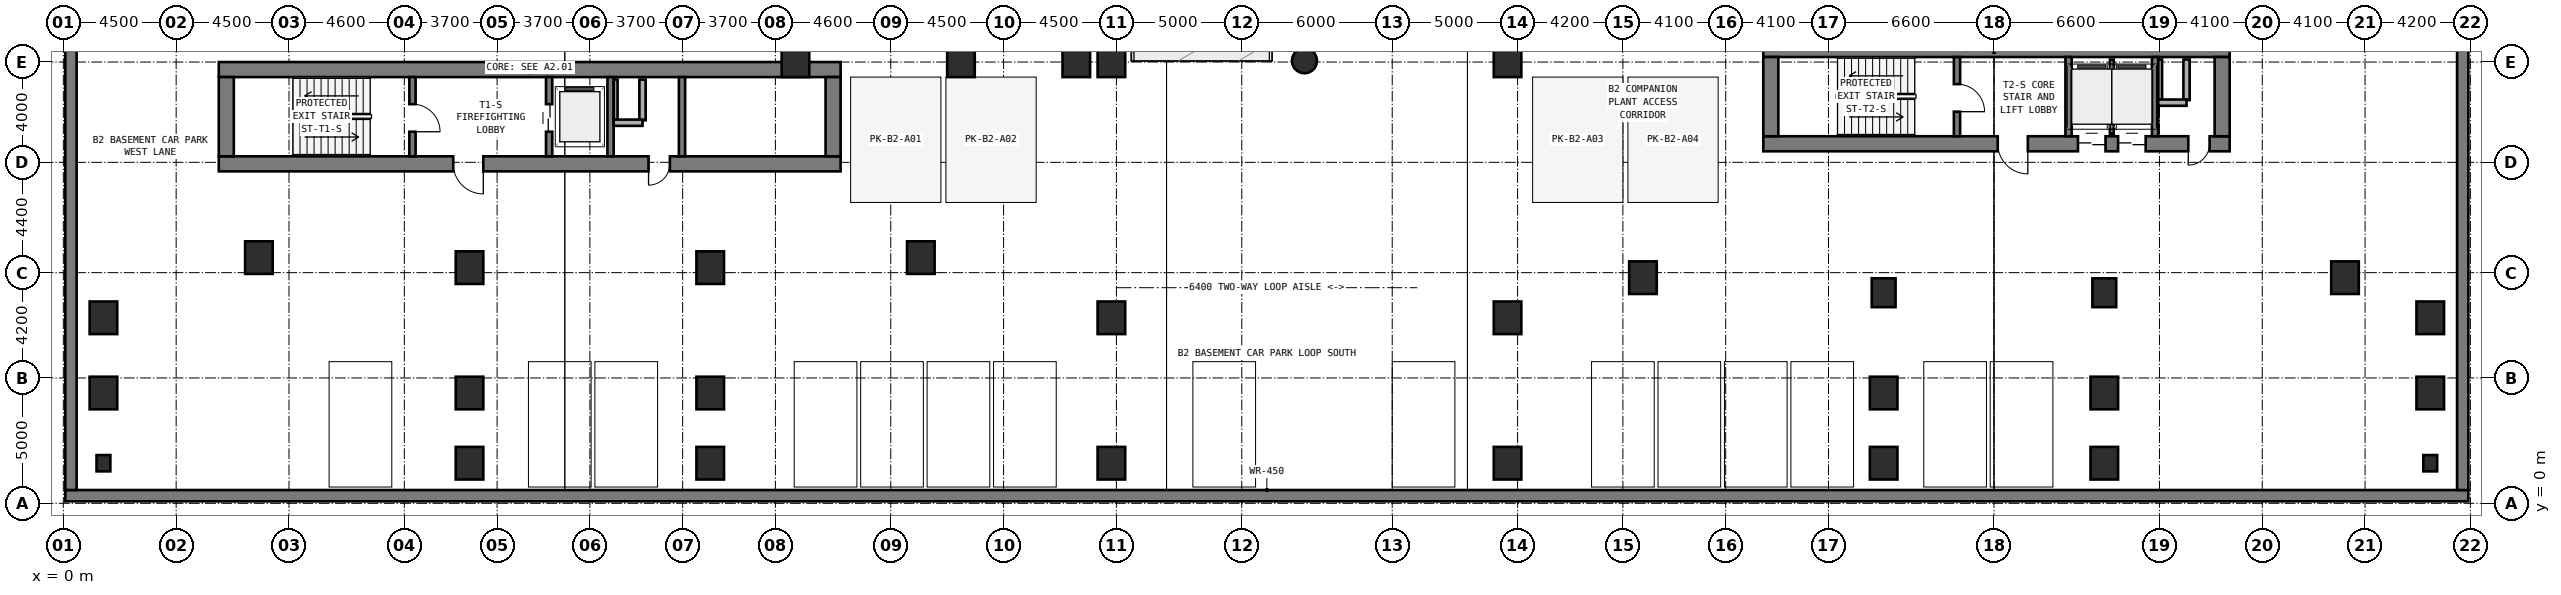
"""IFC4 building model, lengths in metres.
Left out: names, types, materials, properties, quantities, classifications, styles, units other than length and angle.
Written with IfcOpenShell. Run it as: python <this file> out.ifc"""

import sys

from ifc_helpers import new_model, si_unit, direction, frame, frame_2d, origin, origin_2d, place, context, subcontext, project, spatial, rectangle, circle, extrude, element, fill, save


model = new_model("IFC4")
c1 = context("Model", 3, precision=1e-05, world=origin(), true_north=direction((0.0, 1.0)))
c2 = subcontext(c1, "Body", "Model", "MODEL_VIEW")
j1 = project(units=[si_unit("LENGTHUNIT", "METRE"), si_unit("PLANEANGLEUNIT", "RADIAN")], contexts=[c1])
p1 = place(None, origin())
s1 = spatial("IfcSite", under=j1, at=p1, CompositionType="ELEMENT")
p2 = place(p1, origin())
s2 = spatial("IfcBuilding", under=s1, at=p2, CompositionType="ELEMENT")
p3 = place(p2, frame((0.0, 0.0, -8.4)))
s3 = spatial("IfcBuildingStorey", under=s2, at=p3, CompositionType="ELEMENT", Elevation=-8.4)
p4 = place(p3, frame((0.08, 0.305, 0.0), z_axis=(0.0, 0.0, 1.0), x_axis=(1.0, 0.0, 0.0)))
e1 = element("IfcWall", 1, at=p4, inside=s3, PredefinedType="USERDEFINED", context=c2, shape_type="SweptSolid", body=[
    extrude(rectangle(XDim=95.84, YDim=0.45, at=frame_2d((47.92, 0.0))), origin(), (0.0, 0.0, 1.0), 4.2),
])
for number, where, z_axis, x_axis in (
    (2, (0.305, 49.47, 0.0), (0.0, 0.0, 1.0), (0.0, -1.0, 0.0)),
    (3, (95.695, 0.53, 0.0), (0.0, 0.0, 1.0), (0.0, 1.0, 0.0)),
):
    element("IfcWall", number, at=place(p3, frame(where, z_axis=z_axis, x_axis=x_axis)), inside=s3, PredefinedType="USERDEFINED", context=c2, shape_type="SweptSolid", body=[
        extrude(rectangle(XDim=48.94, YDim=0.45, at=frame_2d((24.47, 0.0))), origin(), (0.0, 0.0, 1.0), 4.2),
    ])
p5 = place(p3, frame((6.2, 13.54, 0.0), z_axis=(0.0, 0.0, 1.0), x_axis=(1.0, 0.0, 0.0)))
e4 = element("IfcWall", 4, at=p5, inside=s3, PredefinedType="SHEAR", context=c2, shape_type="SweptSolid", body=[
    extrude(rectangle(XDim=24.8, YDim=0.6, at=frame_2d((12.4, 0.0))), origin(), (0.0, 0.0, 1.0), 4.2),
])
p6 = place(p5, frame((9.35, 0.0, 0.0)))
e5 = element("IfcOpeningElement", 5, at=p6, cuts=e4, PredefinedType="OPENING", context=c2, shape_type="SweptSolid", body=[
    extrude(rectangle(XDim=1.2, YDim=2.15, at=frame_2d((0.6, 1.075))), frame((0.0, 0.31, 0.0), z_axis=(0.0, -1.0, 0.0), x_axis=(1.0, 0.0, 0.0)), (0.0, 0.0, 1.0), 0.62),
])
p7 = place(p5, frame((17.14, 0.0, 0.0)))
e6 = element("IfcOpeningElement", 6, at=p7, cuts=e4, PredefinedType="OPENING", context=c2, shape_type="SweptSolid", body=[
    extrude(rectangle(XDim=0.85, YDim=2.1, at=frame_2d((0.425, 1.05))), frame((0.0, 0.31, 0.0), z_axis=(0.0, -1.0, 0.0), x_axis=(1.0, 0.0, 0.0)), (0.0, 0.0, 1.0), 0.62),
])
p8 = place(p3, frame((6.2, 17.3, 0.0), z_axis=(0.0, 0.0, 1.0), x_axis=(1.0, 0.0, 0.0)))
e7 = element("IfcWall", 7, at=p8, inside=s3, PredefinedType="SHEAR", context=c2, shape_type="SweptSolid", body=[
    extrude(rectangle(XDim=24.8, YDim=0.6, at=frame_2d((12.4, 0.0))), origin(), (0.0, 0.0, 1.0), 4.2),
])
for number, where, z_axis, x_axis in (
    (8, (6.5, 13.84, 0.0), (0.0, 0.0, 1.0), (0.0, 1.0, 0.0)),
    (9, (30.7, 13.84, 0.0), (0.0, 0.0, 1.0), (0.0, 1.0, 0.0)),
):
    element("IfcWall", number, at=place(p3, frame(where, z_axis=z_axis, x_axis=x_axis)), inside=s3, PredefinedType="SHEAR", context=c2, shape_type="SweptSolid", body=[
        extrude(rectangle(XDim=3.16, YDim=0.6, at=frame_2d((1.58, 0.0))), origin(), (0.0, 0.0, 1.0), 4.2),
    ])
p9 = place(p3, frame((13.925, 13.84, 0.0), z_axis=(0.0, 0.0, 1.0), x_axis=(0.0, 1.0, 0.0)))
e10 = element("IfcWall", 10, at=p9, inside=s3, PredefinedType="STANDARD", context=c2, shape_type="SweptSolid", body=[
    extrude(rectangle(XDim=3.16, YDim=0.25, at=frame_2d((1.58, 0.0))), origin(), (0.0, 0.0, 1.0), 3.88),
])
p10 = place(p9, frame((0.98, 0.0, 0.0)))
e11 = element("IfcOpeningElement", 11, at=p10, cuts=e10, PredefinedType="OPENING", context=c2, shape_type="SweptSolid", body=[
    extrude(rectangle(XDim=1.1, YDim=2.15, at=frame_2d((0.55, 1.075))), frame((0.0, 0.135, 0.0), z_axis=(0.0, -1.0, 0.0), x_axis=(1.0, 0.0, 0.0)), (0.0, 0.0, 1.0), 0.27),
])
p11 = place(p3, frame((19.375, 13.84, 0.0), z_axis=(0.0, 0.0, 1.0), x_axis=(0.0, 1.0, 0.0)))
e12 = element("IfcWall", 12, at=p11, inside=s3, PredefinedType="STANDARD", context=c2, shape_type="SweptSolid", body=[
    extrude(rectangle(XDim=3.16, YDim=0.25, at=frame_2d((1.58, 0.0))), origin(), (0.0, 0.0, 1.0), 3.88),
])
p12 = place(p11, frame((0.98, 0.0, 0.0)))
e13 = element("IfcOpeningElement", 13, at=p12, cuts=e12, PredefinedType="OPENING", context=c2, shape_type="SweptSolid", body=[
    extrude(rectangle(XDim=1.1, YDim=2.15, at=frame_2d((0.55, 1.075))), frame((0.0, 0.135, 0.0), z_axis=(0.0, -1.0, 0.0), x_axis=(1.0, 0.0, 0.0)), (0.0, 0.0, 1.0), 0.27),
])
for number, where, z_axis, x_axis in (
    (14, (21.825, 13.84, 0.0), (0.0, 0.0, 1.0), (0.0, 1.0, 0.0)),
    (15, (24.675, 13.84, 0.0), (0.0, 0.0, 1.0), (0.0, 1.0, 0.0)),
):
    element("IfcWall", number, at=place(p3, frame(where, z_axis=z_axis, x_axis=x_axis)), inside=s3, PredefinedType="STANDARD", context=c2, shape_type="SweptSolid", body=[
        extrude(rectangle(XDim=3.16, YDim=0.25, at=frame_2d((1.58, 0.0))), origin(), (0.0, 0.0, 1.0), 3.88),
    ])
p13 = place(p3, frame((67.8, 14.34, 0.0), z_axis=(0.0, 0.0, 1.0), x_axis=(1.0, 0.0, 0.0)))
e16 = element("IfcWall", 16, at=p13, inside=s3, PredefinedType="SHEAR", context=c2, shape_type="SweptSolid", body=[
    extrude(rectangle(XDim=18.6, YDim=0.6, at=frame_2d((9.3, 0.0))), origin(), (0.0, 0.0, 1.0), 4.2),
])
p14 = place(p13, frame((9.35, 0.0, 0.0)))
e17 = element("IfcOpeningElement", 17, at=p14, cuts=e16, PredefinedType="OPENING", context=c2, shape_type="SweptSolid", body=[
    extrude(rectangle(XDim=1.2, YDim=2.15, at=frame_2d((0.6, 1.075))), frame((0.0, 0.31, 0.0), z_axis=(0.0, -1.0, 0.0), x_axis=(1.0, 0.0, 0.0)), (0.0, 0.0, 1.0), 0.62),
])
p15 = place(p13, frame((16.95, 0.0, 0.0)))
e18 = element("IfcOpeningElement", 18, at=p15, cuts=e16, PredefinedType="OPENING", context=c2, shape_type="SweptSolid", body=[
    extrude(rectangle(XDim=0.85, YDim=2.1, at=frame_2d((0.425, 1.05))), frame((0.0, 0.31, 0.0), z_axis=(0.0, -1.0, 0.0), x_axis=(1.0, 0.0, 0.0)), (0.0, 0.0, 1.0), 0.62),
])
p16 = place(p13, frame((12.55, 0.0, 0.0)))
e19 = element("IfcOpeningElement", 19, at=p16, cuts=e16, PredefinedType="OPENING", context=c2, shape_type="SweptSolid", body=[
    extrude(rectangle(XDim=1.1, YDim=2.15, at=frame_2d((0.55, 1.075))), frame((0.0, 0.31, 0.0), z_axis=(0.0, -1.0, 0.0), x_axis=(1.0, 0.0, 0.0)), (0.0, 0.0, 1.0), 0.62),
])
p17 = place(p13, frame((14.15, 0.0, 0.0)))
e20 = element("IfcOpeningElement", 20, at=p17, cuts=e16, PredefinedType="OPENING", context=c2, shape_type="SweptSolid", body=[
    extrude(rectangle(XDim=1.1, YDim=2.15, at=frame_2d((0.55, 1.075))), frame((0.0, 0.31, 0.0), z_axis=(0.0, -1.0, 0.0), x_axis=(1.0, 0.0, 0.0)), (0.0, 0.0, 1.0), 0.62),
])
p18 = place(p3, frame((67.8, 18.1, 0.0), z_axis=(0.0, 0.0, 1.0), x_axis=(1.0, 0.0, 0.0)))
e21 = element("IfcWall", 21, at=p18, inside=s3, PredefinedType="SHEAR", context=c2, shape_type="SweptSolid", body=[
    extrude(rectangle(XDim=18.6, YDim=0.6, at=frame_2d((9.3, 0.0))), origin(), (0.0, 0.0, 1.0), 4.2),
])
for number, where, z_axis, x_axis in (
    (22, (68.1, 14.64, 0.0), (0.0, 0.0, 1.0), (0.0, 1.0, 0.0)),
    (23, (86.1, 14.64, 0.0), (0.0, 0.0, 1.0), (0.0, 1.0, 0.0)),
):
    element("IfcWall", number, at=place(p3, frame(where, z_axis=z_axis, x_axis=x_axis)), inside=s3, PredefinedType="SHEAR", context=c2, shape_type="SweptSolid", body=[
        extrude(rectangle(XDim=3.16, YDim=0.6, at=frame_2d((1.58, 0.0))), origin(), (0.0, 0.0, 1.0), 4.2),
    ])
p19 = place(p3, frame((75.525, 14.64, 0.0), z_axis=(0.0, 0.0, 1.0), x_axis=(0.0, 1.0, 0.0)))
e24 = element("IfcWall", 24, at=p19, inside=s3, PredefinedType="STANDARD", context=c2, shape_type="SweptSolid", body=[
    extrude(rectangle(XDim=3.16, YDim=0.25, at=frame_2d((1.58, 0.0))), origin(), (0.0, 0.0, 1.0), 3.88),
])
p20 = place(p19, frame((0.98, 0.0, 0.0)))
e25 = element("IfcOpeningElement", 25, at=p20, cuts=e24, PredefinedType="OPENING", context=c2, shape_type="SweptSolid", body=[
    extrude(rectangle(XDim=1.1, YDim=2.15, at=frame_2d((0.55, 1.075))), frame((0.0, 0.135, 0.0), z_axis=(0.0, -1.0, 0.0), x_axis=(1.0, 0.0, 0.0)), (0.0, 0.0, 1.0), 0.27),
])
for number, where, z_axis, x_axis in (
    (26, (79.975, 14.64, 0.0), (0.0, 0.0, 1.0), (0.0, 1.0, 0.0)),
    (27, (83.425, 14.64, 0.0), (0.0, 0.0, 1.0), (0.0, 1.0, 0.0)),
):
    element("IfcWall", number, at=place(p3, frame(where, z_axis=z_axis, x_axis=x_axis)), inside=s3, PredefinedType="STANDARD", context=c2, shape_type="SweptSolid", body=[
        extrude(rectangle(XDim=3.16, YDim=0.25, at=frame_2d((1.58, 0.0))), origin(), (0.0, 0.0, 1.0), 3.88),
    ])
for number, where, z_axis, x_axis in (
    (28, (16.2, 9.4, 0.0), (0.0, 0.0, 1.0), (1.0, 0.0, 0.0)),
    (29, (25.8, 9.4, 0.0), (0.0, 0.0, 1.0), (1.0, 0.0, 0.0)),
    (30, (7.8, 9.8, 0.0), (0.0, 0.0, 1.0), (1.0, 0.0, 0.0)),
    (31, (34.2, 9.8, 0.0), (0.0, 0.0, 1.0), (1.0, 0.0, 0.0)),
    (32, (35.8, 17.65, 0.0), (0.0, 0.0, 1.0), (1.0, 0.0, 0.0)),
    (33, (29.2, 17.65, 0.0), (0.0, 0.0, 1.0), (1.0, 0.0, 0.0)),
    (34, (40.4, 17.65, 0.0), (0.0, 0.0, 1.0), (1.0, 0.0, 0.0)),
):
    element("IfcColumn", number, at=place(p3, frame(where, z_axis=z_axis, x_axis=x_axis)), inside=s3, PredefinedType="COLUMN", context=c2, shape_type="SweptSolid", body=[
        extrude(rectangle(XDim=1.1, YDim=1.3, at=origin_2d()), origin(), (0.0, 0.0, 1.0), 4.2),
    ])
for number, where, z_axis, x_axis in (
    (35, (72.6, 8.4, 0.0), (0.0, 0.0, 1.0), (1.0, 0.0, 0.0)),
    (36, (81.4, 8.4, 0.0), (0.0, 0.0, 1.0), (1.0, 0.0, 0.0)),
):
    element("IfcColumn", number, at=place(p3, frame(where, z_axis=z_axis, x_axis=x_axis)), inside=s3, PredefinedType="COLUMN", context=c2, shape_type="SweptSolid", body=[
        extrude(rectangle(XDim=0.95, YDim=1.15, at=origin_2d()), origin(), (0.0, 0.0, 1.0), 4.2),
    ])
for number, where, z_axis, x_axis in (
    (37, (63.0, 9.0, 0.0), (0.0, 0.0, 1.0), (1.0, 0.0, 0.0)),
    (38, (91.0, 9.0, 0.0), (0.0, 0.0, 1.0), (1.0, 0.0, 0.0)),
    (39, (41.8, 17.65, 0.0), (0.0, 0.0, 1.0), (1.0, 0.0, 0.0)),
):
    element("IfcColumn", number, at=place(p3, frame(where, z_axis=z_axis, x_axis=x_axis)), inside=s3, PredefinedType="COLUMN", context=c2, shape_type="SweptSolid", body=[
        extrude(rectangle(XDim=1.1, YDim=1.3, at=origin_2d()), origin(), (0.0, 0.0, 1.0), 4.2),
    ])
p21 = place(p3, frame((49.5, 17.65, 0.0), z_axis=(0.0, 0.0, 1.0), x_axis=(1.0, 0.0, 0.0)))
e40 = element("IfcColumn", 40, at=p21, inside=s3, PredefinedType="COLUMN", context=c2, shape_type="SweptSolid", body=[
    extrude(circle(Radius=0.5, at=origin_2d()), origin(), (0.0, 0.0, 1.0), 4.2),
])
p22 = place(p3, frame((57.6, 17.65, 0.0), z_axis=(0.0, 0.0, 1.0), x_axis=(1.0, 0.0, 0.0)))
e41 = element("IfcColumn", 41, at=p22, inside=s3, PredefinedType="COLUMN", context=c2, shape_type="SweptSolid", body=[
    extrude(rectangle(XDim=1.1, YDim=1.3, at=origin_2d()), origin(), (0.0, 0.0, 1.0), 4.2),
])
p23 = place(p3, frame((1.6, 1.6, 0.0), z_axis=(0.0, 0.0, 1.0), x_axis=(1.0, 0.0, 0.0)))
e42 = element("IfcColumn", 42, at=p23, inside=s3, PredefinedType="PILASTER", context=c2, shape_type="SweptSolid", body=[
    extrude(rectangle(XDim=0.55, YDim=0.65, at=origin_2d()), origin(), (0.0, 0.0, 1.0), 4.2),
])
for number, where, z_axis, x_axis in (
    (43, (16.2, 1.6, 0.0), (0.0, 0.0, 1.0), (1.0, 0.0, 0.0)),
    (44, (25.8, 1.6, 0.0), (0.0, 0.0, 1.0), (1.0, 0.0, 0.0)),
    (45, (41.8, 1.6, 0.0), (0.0, 0.0, 1.0), (1.0, 0.0, 0.0)),
    (46, (57.6, 1.6, 0.0), (0.0, 0.0, 1.0), (1.0, 0.0, 0.0)),
    (47, (72.6, 1.6, 0.0), (0.0, 0.0, 1.0), (1.0, 0.0, 0.0)),
    (48, (81.4, 1.6, 0.0), (0.0, 0.0, 1.0), (1.0, 0.0, 0.0)),
):
    element("IfcColumn", number, at=place(p3, frame(where, z_axis=z_axis, x_axis=x_axis)), inside=s3, PredefinedType="COLUMN", context=c2, shape_type="SweptSolid", body=[
        extrude(rectangle(XDim=1.1, YDim=1.3, at=origin_2d()), origin(), (0.0, 0.0, 1.0), 4.2),
    ])
p24 = place(p3, frame((94.4, 1.6, 0.0), z_axis=(0.0, 0.0, 1.0), x_axis=(1.0, 0.0, 0.0)))
e49 = element("IfcColumn", 49, at=p24, inside=s3, PredefinedType="PILASTER", context=c2, shape_type="SweptSolid", body=[
    extrude(rectangle(XDim=0.55, YDim=0.65, at=origin_2d()), origin(), (0.0, 0.0, 1.0), 4.2),
])
for number, where, z_axis, x_axis in (
    (50, (1.6, 4.4, 0.0), (0.0, 0.0, 1.0), (1.0, 0.0, 0.0)),
    (51, (16.2, 4.4, 0.0), (0.0, 0.0, 1.0), (1.0, 0.0, 0.0)),
    (52, (25.8, 4.4, 0.0), (0.0, 0.0, 1.0), (1.0, 0.0, 0.0)),
    (53, (72.6, 4.4, 0.0), (0.0, 0.0, 1.0), (1.0, 0.0, 0.0)),
    (54, (81.4, 4.4, 0.0), (0.0, 0.0, 1.0), (1.0, 0.0, 0.0)),
    (55, (94.4, 4.4, 0.0), (0.0, 0.0, 1.0), (1.0, 0.0, 0.0)),
    (56, (1.6, 7.4, 0.0), (0.0, 0.0, 1.0), (1.0, 0.0, 0.0)),
    (57, (41.8, 7.4, 0.0), (0.0, 0.0, 1.0), (1.0, 0.0, 0.0)),
    (58, (57.6, 7.4, 0.0), (0.0, 0.0, 1.0), (1.0, 0.0, 0.0)),
    (59, (94.4, 7.4, 0.0), (0.0, 0.0, 1.0), (1.0, 0.0, 0.0)),
):
    element("IfcColumn", number, at=place(p3, frame(where, z_axis=z_axis, x_axis=x_axis)), inside=s3, PredefinedType="COLUMN", context=c2, shape_type="SweptSolid", body=[
        extrude(rectangle(XDim=1.1, YDim=1.3, at=origin_2d()), origin(), (0.0, 0.0, 1.0), 4.2),
    ])
p25 = place(p3, frame((22.03, 15.28, 0.0), z_axis=(0.0, 0.0, 1.0), x_axis=(0.0, 1.0, 0.0)))
e60 = element("IfcWall", 60, at=p25, inside=s3, PredefinedType="PARTITIONING", context=c2, shape_type="SweptSolid", body=[
    extrude(rectangle(XDim=1.62, YDim=0.15, at=frame_2d((0.81, 0.0))), origin(), (0.0, 0.0, 1.0), 3.88),
])
p26 = place(p3, frame((23.1, 15.28, 0.0), z_axis=(0.0, 0.0, 1.0), x_axis=(0.0, 1.0, 0.0)))
e61 = element("IfcWall", 61, at=p26, inside=s3, PredefinedType="SOLIDWALL", context=c2, shape_type="SweptSolid", body=[
    extrude(rectangle(XDim=1.62, YDim=0.25, at=frame_2d((0.81, 0.0))), origin(), (0.0, 0.0, 1.0), 3.88),
])
p27 = place(p3, frame((21.95, 15.18, 0.0), z_axis=(0.0, 0.0, 1.0), x_axis=(1.0, 0.0, 0.0)))
e62 = element("IfcWall", 62, at=p27, inside=s3, PredefinedType="SOLIDWALL", context=c2, shape_type="SweptSolid", body=[
    extrude(rectangle(XDim=1.15, YDim=0.25, at=frame_2d((0.575, 0.0))), origin(), (0.0, 0.0, 1.0), 3.88),
])
p28 = place(p3, frame((83.63, 16.08, 0.0), z_axis=(0.0, 0.0, 1.0), x_axis=(0.0, 1.0, 0.0)))
e63 = element("IfcWall", 63, at=p28, inside=s3, PredefinedType="PARTITIONING", context=c2, shape_type="SweptSolid", body=[
    extrude(rectangle(XDim=1.62, YDim=0.15, at=frame_2d((0.81, 0.0))), origin(), (0.0, 0.0, 1.0), 3.355),
])
p29 = place(p3, frame((84.68, 16.08, 0.0), z_axis=(0.0, 0.0, 1.0), x_axis=(0.0, 1.0, 0.0)))
e64 = element("IfcWall", 64, at=p29, inside=s3, PredefinedType="SOLIDWALL", context=c2, shape_type="SweptSolid", body=[
    extrude(rectangle(XDim=1.62, YDim=0.25, at=frame_2d((0.81, 0.0))), origin(), (0.0, 0.0, 1.0), 3.88),
])
p30 = place(p3, frame((83.55, 15.98, 0.0), z_axis=(0.0, 0.0, 1.0), x_axis=(1.0, 0.0, 0.0)))
e65 = element("IfcWall", 65, at=p30, inside=s3, PredefinedType="SOLIDWALL", context=c2, shape_type="SweptSolid", body=[
    extrude(rectangle(XDim=1.13, YDim=0.25, at=frame_2d((0.565, 0.0))), origin(), (0.0, 0.0, 1.0), 3.88),
])
p31 = place(p3, frame((81.7, 14.74, 0.0), z_axis=(0.0, 0.0, 1.0), x_axis=(0.0, 1.0, 0.0)))
e66 = element("IfcWall", 66, at=p31, inside=s3, PredefinedType="PARTITIONING", context=c2, shape_type="SweptSolid", body=[
    extrude(rectangle(XDim=2.96, YDim=0.15, at=frame_2d((1.48, 0.0))), origin(), (0.0, 0.0, 1.0), 3.88),
])
p32 = place(p10, frame((1.1, 0.0, 0.0), z_axis=(0.0, 0.0, 1.0), x_axis=(-1.0, 0.0, 0.0)))
e67 = element("IfcDoor", 67, at=p32, inside=s3, OperationType="SINGLE_SWING_RIGHT", PredefinedType="DOOR", context=c2, shape_type="SweptSolid", body=[
    extrude(rectangle(XDim=1.1, YDim=2.15, at=frame_2d((0.55, 1.075))), frame((0.0, 0.025, 0.0), z_axis=(0.0, -1.0, 0.0), x_axis=(1.0, 0.0, 0.0)), (0.0, 0.0, 1.0), 0.05),
])
fill(e11, e67)
p33 = place(p6, frame((1.2, 0.0, 0.0), z_axis=(0.0, 0.0, 1.0), x_axis=(-1.0, 0.0, 0.0)))
e68 = element("IfcDoor", 68, at=p33, inside=s3, OperationType="SINGLE_SWING_LEFT", PredefinedType="DOOR", context=c2, shape_type="SweptSolid", body=[
    extrude(rectangle(XDim=1.2, YDim=2.15, at=frame_2d((0.6, 1.075))), frame((0.0, 0.025, 0.0), z_axis=(0.0, -1.0, 0.0), x_axis=(1.0, 0.0, 0.0)), (0.0, 0.0, 1.0), 0.05),
])
fill(e5, e68)
p34 = place(p12, origin())
e69 = element("IfcDoor", 69, at=p34, inside=s3, OperationType="DOUBLE_DOOR_SLIDING", PredefinedType="DOOR", context=c2, shape_type="SweptSolid", body=[
    extrude(rectangle(XDim=1.1, YDim=2.15, at=frame_2d((0.55, 1.075))), frame((0.0, 0.025, 0.0), z_axis=(0.0, -1.0, 0.0), x_axis=(1.0, 0.0, 0.0)), (0.0, 0.0, 1.0), 0.05),
])
fill(e13, e69)
p35 = place(p7, frame((0.85, 0.0, 0.0), z_axis=(0.0, 0.0, 1.0), x_axis=(-1.0, 0.0, 0.0)))
e70 = element("IfcDoor", 70, at=p35, inside=s3, OperationType="SINGLE_SWING_RIGHT", PredefinedType="DOOR", context=c2, shape_type="SweptSolid", body=[
    extrude(rectangle(XDim=0.85, YDim=2.1, at=frame_2d((0.425, 1.05))), frame((0.0, 0.025, 0.0), z_axis=(0.0, -1.0, 0.0), x_axis=(1.0, 0.0, 0.0)), (0.0, 0.0, 1.0), 0.05),
])
fill(e6, e70)
p36 = place(p20, frame((1.1, 0.0, 0.0), z_axis=(0.0, 0.0, 1.0), x_axis=(-1.0, 0.0, 0.0)))
e71 = element("IfcDoor", 71, at=p36, inside=s3, OperationType="SINGLE_SWING_RIGHT", PredefinedType="DOOR", context=c2, shape_type="SweptSolid", body=[
    extrude(rectangle(XDim=1.1, YDim=2.15, at=frame_2d((0.55, 1.075))), frame((0.0, 0.025, 0.0), z_axis=(0.0, -1.0, 0.0), x_axis=(1.0, 0.0, 0.0)), (0.0, 0.0, 1.0), 0.05),
])
fill(e25, e71)
p37 = place(p14, frame((1.2, 0.0, 0.0), z_axis=(0.0, 0.0, 1.0), x_axis=(-1.0, 0.0, 0.0)))
e72 = element("IfcDoor", 72, at=p37, inside=s3, OperationType="SINGLE_SWING_LEFT", PredefinedType="DOOR", context=c2, shape_type="SweptSolid", body=[
    extrude(rectangle(XDim=1.2, YDim=2.15, at=frame_2d((0.6, 1.075))), frame((0.0, 0.025, 0.0), z_axis=(0.0, -1.0, 0.0), x_axis=(1.0, 0.0, 0.0)), (0.0, 0.0, 1.0), 0.05),
])
fill(e17, e72)
p38 = place(p15, frame((0.85, 0.0, 0.0), z_axis=(0.0, 0.0, 1.0), x_axis=(-1.0, 0.0, 0.0)))
e73 = element("IfcDoor", 73, at=p38, inside=s3, OperationType="SINGLE_SWING_RIGHT", PredefinedType="DOOR", context=c2, shape_type="SweptSolid", body=[
    extrude(rectangle(XDim=0.85, YDim=2.1, at=frame_2d((0.425, 1.05))), frame((0.0, 0.025, 0.0), z_axis=(0.0, -1.0, 0.0), x_axis=(1.0, 0.0, 0.0)), (0.0, 0.0, 1.0), 0.05),
])
fill(e18, e73)
p39 = place(p16, frame((1.1, 0.0, 0.0), z_axis=(0.0, 0.0, 1.0), x_axis=(-1.0, 0.0, 0.0)))
e74 = element("IfcDoor", 74, at=p39, inside=s3, OperationType="DOUBLE_DOOR_SLIDING", PredefinedType="DOOR", context=c2, shape_type="SweptSolid", body=[
    extrude(rectangle(XDim=1.1, YDim=2.15, at=frame_2d((0.55, 1.075))), frame((0.0, 0.025, 0.0), z_axis=(0.0, -1.0, 0.0), x_axis=(1.0, 0.0, 0.0)), (0.0, 0.0, 1.0), 0.05),
])
fill(e19, e74)
p40 = place(p17, frame((1.1, 0.0, 0.0), z_axis=(0.0, 0.0, 1.0), x_axis=(-1.0, 0.0, 0.0)))
e75 = element("IfcDoor", 75, at=p40, inside=s3, OperationType="DOUBLE_DOOR_SLIDING", PredefinedType="DOOR", context=c2, shape_type="SweptSolid", body=[
    extrude(rectangle(XDim=1.1, YDim=2.15, at=frame_2d((0.55, 1.075))), frame((0.0, 0.025, 0.0), z_axis=(0.0, -1.0, 0.0), x_axis=(1.0, 0.0, 0.0)), (0.0, 0.0, 1.0), 0.05),
])
fill(e20, e75)
save(model, sys.argv[1])
